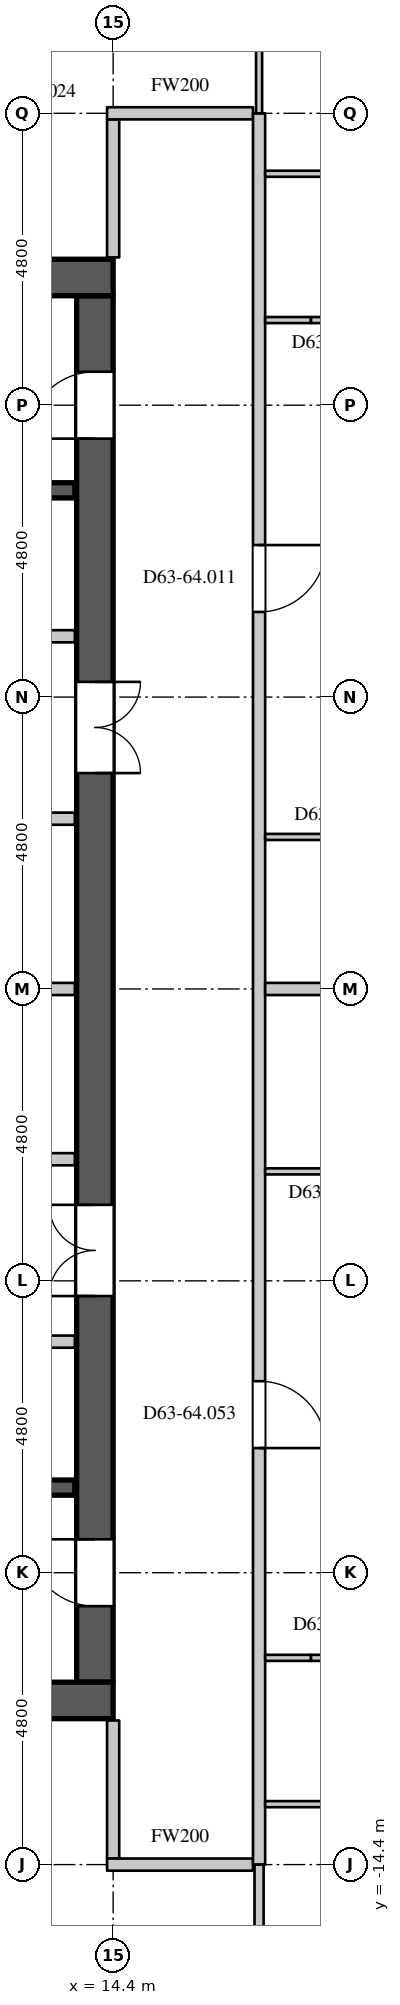
"""IFC4 building model, lengths in metres.
Left out: names, types, materials, properties, quantities, classifications, styles, units other than length and angle.
Written with IfcOpenShell. Run it as: python <this file> out.ifc"""

import sys

from ifc_helpers import new_model, si_unit, direction, frame, frame_2d, origin, place, context, subcontext, project, spatial, rectangle, extrude, element, fill, save


model = new_model("IFC4")
c1 = context("Model", 3, precision=1e-05, world=origin(), true_north=direction((0.0, 1.0)))
c2 = subcontext(c1, "Body", "Model", "MODEL_VIEW")
j1 = project(units=[si_unit("LENGTHUNIT", "METRE"), si_unit("PLANEANGLEUNIT", "RADIAN")], contexts=[c1])
p1 = place(None, origin())
s1 = spatial("IfcSite", under=j1, at=p1, CompositionType="ELEMENT")
p2 = place(p1, origin())
s2 = spatial("IfcBuilding", under=s1, at=p2, CompositionType="ELEMENT")
p3 = place(p2, frame((0.0, 0.0, 272.7)))
s3 = spatial("IfcBuildingStorey", under=s2, at=p3, CompositionType="ELEMENT", Elevation=272.7)
for number, where, z_axis, x_axis in (
    (1, (-14.4, 11.7, 0.0), (0.0, 0.0, 1.0), (1.0, 0.0, 0.0)),
    (2, (-14.4, -11.7, 0.0), (0.0, 0.0, 1.0), (1.0, 0.0, 0.0)),
):
    element("IfcWall", number, at=place(p3, frame(where, z_axis=z_axis, x_axis=x_axis)), inside=s3, PredefinedType="SHEAR", context=c2, shape_type="SweptSolid", body=[
        extrude(rectangle(XDim=28.8, YDim=0.6, at=frame_2d((14.4, 0.0))), origin(), (0.0, 0.0, 1.0), 4.2),
    ])
p4 = place(p3, frame((14.1, -11.4, 0.0), z_axis=(0.0, 0.0, 1.0), x_axis=(0.0, 1.0, 0.0)))
e3 = element("IfcWall", 3, at=p4, inside=s3, PredefinedType="SHEAR", context=c2, shape_type="SweptSolid", body=[
    extrude(rectangle(XDim=22.8, YDim=0.6, at=frame_2d((11.4, 0.0))), origin(), (0.0, 0.0, 1.0), 4.2),
])
p5 = place(p4, frame((20.45, 0.0, 0.0)))
e4 = element("IfcOpeningElement", 4, at=p5, cuts=e3, PredefinedType="OPENING", context=c2, shape_type="SweptSolid", body=[
    extrude(rectangle(XDim=1.1, YDim=2.2, at=frame_2d((0.55, 1.1))), frame((0.0, 0.31, 0.0), z_axis=(0.0, -1.0, 0.0), x_axis=(1.0, 0.0, 0.0)), (0.0, 0.0, 1.0), 0.62),
])
p6 = place(p4, frame((1.25, 0.0, 0.0)))
e5 = element("IfcOpeningElement", 5, at=p6, cuts=e3, PredefinedType="OPENING", context=c2, shape_type="SweptSolid", body=[
    extrude(rectangle(XDim=1.1, YDim=2.2, at=frame_2d((0.55, 1.1))), frame((0.0, 0.31, 0.0), z_axis=(0.0, -1.0, 0.0), x_axis=(1.0, 0.0, 0.0)), (0.0, 0.0, 1.0), 0.62),
])
p7 = place(p4, frame((14.95, 0.0, 0.0)))
e6 = element("IfcOpeningElement", 6, at=p7, cuts=e3, PredefinedType="OPENING", context=c2, shape_type="SweptSolid", body=[
    extrude(rectangle(XDim=1.5, YDim=2.4, at=frame_2d((0.75, 1.2))), frame((0.0, 0.31, 0.0), z_axis=(0.0, -1.0, 0.0), x_axis=(1.0, 0.0, 0.0)), (0.0, 0.0, 1.0), 0.62),
])
p8 = place(p4, frame((6.35, 0.0, 0.0)))
e7 = element("IfcOpeningElement", 7, at=p8, cuts=e3, PredefinedType="OPENING", context=c2, shape_type="SweptSolid", body=[
    extrude(rectangle(XDim=1.5, YDim=2.4, at=frame_2d((0.75, 1.2))), frame((0.0, 0.31, 0.0), z_axis=(0.0, -1.0, 0.0), x_axis=(1.0, 0.0, 0.0)), (0.0, 0.0, 1.0), 0.62),
])
p9 = place(p3, frame((0.98, 5.8, 0.0), z_axis=(0.0, 0.0, 1.0), x_axis=(1.0, 0.0, 0.0)))
e8 = element("IfcWall", 8, at=p9, inside=s3, PredefinedType="PARTITIONING", context=c2, shape_type="SweptSolid", body=[
    extrude(rectangle(XDim=12.79, YDim=0.2, at=frame_2d((6.395, 0.0))), origin(), (0.0, 0.0, 1.0), 3.95),
])
p10 = place(p9, frame((3.05, 0.0, 0.0)))
e9 = element("IfcOpeningElement", 9, at=p10, cuts=e8, PredefinedType="OPENING", context=c2, shape_type="SweptSolid", body=[
    extrude(rectangle(XDim=0.9, YDim=2.2, at=frame_2d((0.45, 1.1))), frame((0.0, 0.11, 0.0), z_axis=(0.0, -1.0, 0.0), x_axis=(1.0, 0.0, 0.0)), (0.0, 0.0, 1.0), 0.22),
])
p11 = place(p9, frame((9.25, 0.0, 0.0)))
e10 = element("IfcOpeningElement", 10, at=p11, cuts=e8, PredefinedType="OPENING", context=c2, shape_type="SweptSolid", body=[
    extrude(rectangle(XDim=0.9, YDim=2.2, at=frame_2d((0.45, 1.1))), frame((0.0, 0.11, 0.0), z_axis=(0.0, -1.0, 0.0), x_axis=(1.0, 0.0, 0.0)), (0.0, 0.0, 1.0), 0.22),
])
p12 = place(p3, frame((4.02, -5.8, 0.0), z_axis=(0.0, 0.0, 1.0), x_axis=(1.0, 0.0, 0.0)))
e11 = element("IfcWall", 11, at=p12, inside=s3, PredefinedType="PARTITIONING", context=c2, shape_type="SweptSolid", body=[
    extrude(rectangle(XDim=9.75, YDim=0.2, at=frame_2d((4.875, 0.0))), origin(), (0.0, 0.0, 1.0), 3.95),
])
p13 = place(p12, frame((4.45, 0.0, 0.0)))
e12 = element("IfcOpeningElement", 12, at=p13, cuts=e11, PredefinedType="OPENING", context=c2, shape_type="SweptSolid", body=[
    extrude(rectangle(XDim=0.9, YDim=2.2, at=frame_2d((0.45, 1.1))), frame((0.0, 0.11, 0.0), z_axis=(0.0, -1.0, 0.0), x_axis=(1.0, 0.0, 0.0)), (0.0, 0.0, 1.0), 0.22),
])
p14 = place(p3, frame((14.4, -14.3, 0.0), z_axis=(0.0, 0.0, 1.0), x_axis=(0.0, 1.0, 0.0)))
e13 = element("IfcWall", 13, at=p14, inside=s3, PredefinedType="PARTITIONING", context=c2, shape_type="SweptSolid", body=[
    extrude(rectangle(XDim=2.27, YDim=0.2, at=frame_2d((1.135, 0.0))), origin(), (0.0, 0.0, 1.0), 3.95),
])
p15 = place(p3, frame((14.3, -14.4, 0.0), z_axis=(0.0, 0.0, 1.0), x_axis=(1.0, 0.0, 0.0)))
e14 = element("IfcWall", 14, at=p15, inside=s3, PredefinedType="PARTITIONING", context=c2, shape_type="SweptSolid", body=[
    extrude(rectangle(XDim=2.4, YDim=0.2, at=frame_2d((1.2, 0.0))), origin(), (0.0, 0.0, 1.0), 3.95),
])
p16 = place(p3, frame((14.4, 12.03, 0.0), z_axis=(0.0, 0.0, 1.0), x_axis=(0.0, 1.0, 0.0)))
e15 = element("IfcWall", 15, at=p16, inside=s3, PredefinedType="PARTITIONING", context=c2, shape_type="SweptSolid", body=[
    extrude(rectangle(XDim=2.27, YDim=0.2, at=frame_2d((1.135, 0.0))), origin(), (0.0, 0.0, 1.0), 3.95),
])
p17 = place(p3, frame((14.3, 14.4, 0.0), z_axis=(0.0, 0.0, 1.0), x_axis=(1.0, 0.0, 0.0)))
e16 = element("IfcWall", 16, at=p17, inside=s3, PredefinedType="PARTITIONING", context=c2, shape_type="SweptSolid", body=[
    extrude(rectangle(XDim=2.4, YDim=0.2, at=frame_2d((1.2, 0.0))), origin(), (0.0, 0.0, 1.0), 3.95),
])
p18 = place(p3, frame((16.8, -14.4, 0.0), z_axis=(0.0, 0.0, 1.0), x_axis=(0.0, 1.0, 0.0)))
e17 = element("IfcWall", 17, at=p18, inside=s3, PredefinedType="PARTITIONING", context=c2, shape_type="SweptSolid", body=[
    extrude(rectangle(XDim=28.8, YDim=0.2, at=frame_2d((14.4, 0.0))), origin(), (0.0, 0.0, 1.0), 3.95),
])
p19 = place(p18, frame((20.6, 0.0, 0.0)))
e18 = element("IfcOpeningElement", 18, at=p19, cuts=e17, PredefinedType="OPENING", context=c2, shape_type="SweptSolid", body=[
    extrude(rectangle(XDim=1.1, YDim=2.4, at=frame_2d((0.55, 1.2))), frame((0.0, 0.11, 0.0), z_axis=(0.0, -1.0, 0.0), x_axis=(1.0, 0.0, 0.0)), (0.0, 0.0, 1.0), 0.22),
])
p20 = place(p18, frame((6.85, 0.0, 0.0)))
e19 = element("IfcOpeningElement", 19, at=p20, cuts=e17, PredefinedType="OPENING", context=c2, shape_type="SweptSolid", body=[
    extrude(rectangle(XDim=1.1, YDim=2.4, at=frame_2d((0.55, 1.2))), frame((0.0, 0.11, 0.0), z_axis=(0.0, -1.0, 0.0), x_axis=(1.0, 0.0, 0.0)), (0.0, 0.0, 1.0), 0.22),
])
p21 = place(p3, frame((16.8, -19.828, 0.0), z_axis=(0.0, 0.0, 1.0), x_axis=(0.0, 1.0, 0.0)))
e20 = element("IfcWall", 20, at=p21, inside=s3, PredefinedType="PARTITIONING", context=c2, shape_type="SweptSolid", body=[
    extrude(rectangle(XDim=5.428, YDim=0.15, at=frame_2d((2.714, 0.0))), origin(), (0.0, 0.0, 1.0), 3.95),
])
p22 = place(p21, frame((2.85, 0.0, 0.0)))
e21 = element("IfcOpeningElement", 21, at=p22, cuts=e20, PredefinedType="OPENING", context=c2, shape_type="SweptSolid", body=[
    extrude(rectangle(XDim=0.9, YDim=2.2, at=frame_2d((0.45, 1.1))), frame((0.0, 0.085, 0.0), z_axis=(0.0, -1.0, 0.0), x_axis=(1.0, 0.0, 0.0)), (0.0, 0.0, 1.0), 0.17),
])
p23 = place(p21, frame((0.2, 0.0, 0.0)))
e22 = element("IfcOpeningElement", 22, at=p23, cuts=e20, PredefinedType="OPENING", context=c2, shape_type="SweptSolid", body=[
    extrude(rectangle(XDim=0.95, YDim=2.2, at=frame_2d((0.475, 1.1))), frame((0.0, 0.085, 0.0), z_axis=(0.0, -1.0, 0.0), x_axis=(1.0, 0.0, 0.0)), (0.0, 0.0, 1.0), 0.17),
])
p24 = place(p3, frame((16.9, 0.0, 0.0), z_axis=(0.0, 0.0, 1.0), x_axis=(1.0, 0.0, 0.0)))
e23 = element("IfcWall", 23, at=p24, inside=s3, PredefinedType="PARTITIONING", context=c2, shape_type="SweptSolid", body=[
    extrude(rectangle(XDim=9.555, YDim=0.2, at=frame_2d((4.778, 0.0))), origin(), (0.0, 0.0, 1.0), 3.95),
])
p25 = place(p3, frame((7.8, -2.8, 0.0), z_axis=(0.0, 0.0, 1.0), x_axis=(1.0, 0.0, 0.0)))
e24 = element("IfcWall", 24, at=p25, inside=s3, PredefinedType="PARTITIONING", context=c2, shape_type="SweptSolid", body=[
    extrude(rectangle(XDim=5.97, YDim=0.2, at=frame_2d((2.985, 0.0))), origin(), (0.0, 0.0, 1.0), 3.95),
])
p26 = place(p25, frame((2.55, 0.0, 0.0)))
e25 = element("IfcOpeningElement", 25, at=p26, cuts=e24, PredefinedType="OPENING", context=c2, shape_type="SweptSolid", body=[
    extrude(rectangle(XDim=0.9, YDim=2.2, at=frame_2d((0.45, 1.1))), frame((0.0, 0.11, 0.0), z_axis=(0.0, -1.0, 0.0), x_axis=(1.0, 0.0, 0.0)), (0.0, 0.0, 1.0), 0.22),
])
p27 = place(p3, frame((7.8, 0.0, 0.0), z_axis=(0.0, 0.0, 1.0), x_axis=(1.0, 0.0, 0.0)))
e26 = element("IfcWall", 26, at=p27, inside=s3, PredefinedType="PARTITIONING", context=c2, shape_type="SweptSolid", body=[
    extrude(rectangle(XDim=5.97, YDim=0.2, at=frame_2d((2.985, 0.0))), origin(), (0.0, 0.0, 1.0), 3.95),
])
p28 = place(p3, frame((10.42, 2.8, 0.0), z_axis=(0.0, 0.0, 1.0), x_axis=(1.0, 0.0, 0.0)))
e27 = element("IfcWall", 27, at=p28, inside=s3, PredefinedType="PARTITIONING", context=c2, shape_type="SweptSolid", body=[
    extrude(rectangle(XDim=3.35, YDim=0.2, at=frame_2d((1.675, 0.0))), origin(), (0.0, 0.0, 1.0), 3.95),
])
p29 = place(p28, frame((1.35, 0.0, 0.0)))
e28 = element("IfcOpeningElement", 28, at=p29, cuts=e27, PredefinedType="OPENING", context=c2, shape_type="SweptSolid", body=[
    extrude(rectangle(XDim=0.6, YDim=2.0, at=frame_2d((0.3, 1.0))), frame((0.0, 0.11, 0.0), z_axis=(0.0, -1.0, 0.0), x_axis=(1.0, 0.0, 0.0)), (0.0, 0.0, 1.0), 0.22),
])
for number, where, z_axis, x_axis in (
    (29, (5.275, -8.2, 0.0), (0.0, 0.0, 1.0), (1.0, 0.0, 0.0)),
    (30, (5.275, 8.2, 0.0), (0.0, 0.0, 1.0), (1.0, 0.0, 0.0)),
):
    element("IfcWall", number, at=place(p3, frame(where, z_axis=z_axis, x_axis=x_axis)), inside=s3, PredefinedType="SHEAR", context=c2, shape_type="SweptSolid", body=[
        extrude(rectangle(XDim=8.495, YDim=0.25, at=frame_2d((4.248, 0.0))), origin(), (0.0, 0.0, 1.0), 3.95),
    ])
p30 = place(p3, frame((16.9, -13.406, 0.0), z_axis=(0.0, 0.0, 1.0), x_axis=(1.0, 0.0, 0.0)))
e31 = element("IfcWall", 31, at=p30, inside=s3, PredefinedType="PARTITIONING", context=c2, shape_type="SweptSolid", body=[
    extrude(rectangle(XDim=3.6, YDim=0.1, at=frame_2d((1.8, 0.0))), origin(), (0.0, 0.0, 1.0), 3.95),
])
p31 = place(p3, frame((16.9, -11.0, 0.0), z_axis=(0.0, 0.0, 1.0), x_axis=(1.0, 0.0, 0.0)))
e32 = element("IfcWall", 32, at=p31, inside=s3, PredefinedType="PARTITIONING", context=c2, shape_type="SweptSolid", body=[
    extrude(rectangle(XDim=0.754, YDim=0.1, at=frame_2d((0.377, 0.0))), origin(), (0.0, 0.0, 1.0), 3.35),
])
p32 = place(p3, frame((17.654, -11.0, 0.0), z_axis=(0.0, 0.0, 1.0), x_axis=(1.0, 0.0, 0.0)))
e33 = element("IfcWall", 33, at=p32, inside=s3, PredefinedType="PARTITIONING", context=c2, shape_type="SweptSolid", body=[
    extrude(rectangle(XDim=2.771, YDim=0.1, at=frame_2d((1.386, 0.0))), origin(), (0.0, 0.0, 1.0), 3.95),
])
p33 = place(p32, frame((0.546, 0.0, 0.0)))
e34 = element("IfcOpeningElement", 34, at=p33, cuts=e33, PredefinedType="OPENING", context=c2, shape_type="SweptSolid", body=[
    extrude(rectangle(XDim=0.9, YDim=2.2, at=frame_2d((0.45, 1.1))), frame((0.0, 0.06, 0.0), z_axis=(0.0, -1.0, 0.0), x_axis=(1.0, 0.0, 0.0)), (0.0, 0.0, 1.0), 0.12),
])
p34 = place(p3, frame((16.9, -3.0, 0.0), z_axis=(0.0, 0.0, 1.0), x_axis=(1.0, 0.0, 0.0)))
e35 = element("IfcWall", 35, at=p34, inside=s3, PredefinedType="PARTITIONING", context=c2, shape_type="SweptSolid", body=[
    extrude(rectangle(XDim=3.025, YDim=0.1, at=frame_2d((1.513, 0.0))), origin(), (0.0, 0.0, 1.0), 3.95),
])
p35 = place(p34, frame((1.05, 0.0, 0.0)))
e36 = element("IfcOpeningElement", 36, at=p35, cuts=e35, PredefinedType="OPENING", context=c2, shape_type="SweptSolid", body=[
    extrude(rectangle(XDim=0.9, YDim=2.2, at=frame_2d((0.45, 1.1))), frame((0.0, 0.06, 0.0), z_axis=(0.0, -1.0, 0.0), x_axis=(1.0, 0.0, 0.0)), (0.0, 0.0, 1.0), 0.12),
])
p36 = place(p3, frame((16.9, 2.5, 0.0), z_axis=(0.0, 0.0, 1.0), x_axis=(1.0, 0.0, 0.0)))
e37 = element("IfcWall", 37, at=p36, inside=s3, PredefinedType="PARTITIONING", context=c2, shape_type="SweptSolid", body=[
    extrude(rectangle(XDim=3.225, YDim=0.1, at=frame_2d((1.613, 0.0))), origin(), (0.0, 0.0, 1.0), 3.95),
])
p37 = place(p36, frame((1.15, 0.0, 0.0)))
e38 = element("IfcOpeningElement", 38, at=p37, cuts=e37, PredefinedType="OPENING", context=c2, shape_type="SweptSolid", body=[
    extrude(rectangle(XDim=0.9, YDim=2.2, at=frame_2d((0.45, 1.1))), frame((0.0, 0.06, 0.0), z_axis=(0.0, -1.0, 0.0), x_axis=(1.0, 0.0, 0.0)), (0.0, 0.0, 1.0), 0.12),
])
p38 = place(p3, frame((16.9, 11.0, 0.0), z_axis=(0.0, 0.0, 1.0), x_axis=(1.0, 0.0, 0.0)))
e39 = element("IfcWall", 39, at=p38, inside=s3, PredefinedType="PARTITIONING", context=c2, shape_type="SweptSolid", body=[
    extrude(rectangle(XDim=0.754, YDim=0.1, at=frame_2d((0.377, 0.0))), origin(), (0.0, 0.0, 1.0), 3.35),
])
p39 = place(p3, frame((17.654, 11.0, 0.0), z_axis=(0.0, 0.0, 1.0), x_axis=(1.0, 0.0, 0.0)))
e40 = element("IfcWall", 40, at=p39, inside=s3, PredefinedType="PARTITIONING", context=c2, shape_type="SweptSolid", body=[
    extrude(rectangle(XDim=2.971, YDim=0.1, at=frame_2d((1.486, 0.0))), origin(), (0.0, 0.0, 1.0), 3.95),
])
p40 = place(p39, frame((0.646, 0.0, 0.0)))
e41 = element("IfcOpeningElement", 41, at=p40, cuts=e40, PredefinedType="OPENING", context=c2, shape_type="SweptSolid", body=[
    extrude(rectangle(XDim=0.9, YDim=2.2, at=frame_2d((0.45, 1.1))), frame((0.0, 0.06, 0.0), z_axis=(0.0, -1.0, 0.0), x_axis=(1.0, 0.0, 0.0)), (0.0, 0.0, 1.0), 0.12),
])
p41 = place(p3, frame((16.9, 13.406, 0.0), z_axis=(0.0, 0.0, 1.0), x_axis=(1.0, 0.0, 0.0)))
e42 = element("IfcWall", 42, at=p41, inside=s3, PredefinedType="PARTITIONING", context=c2, shape_type="SweptSolid", body=[
    extrude(rectangle(XDim=3.8, YDim=0.1, at=frame_2d((1.9, 0.0))), origin(), (0.0, 0.0, 1.0), 3.95),
])
p42 = place(p3, frame((16.8, 14.4, 0.0), z_axis=(0.0, 0.0, 1.0), x_axis=(0.0, 1.0, 0.0)))
e43 = element("IfcWall", 43, at=p42, inside=s3, PredefinedType="PARTITIONING", context=c2, shape_type="SweptSolid", body=[
    extrude(rectangle(XDim=3.6, YDim=0.1, at=frame_2d((1.8, 0.0))), origin(), (0.0, 0.0, 1.0), 3.95),
])
p43 = place(p5, origin())
e44 = element("IfcDoor", 44, at=p43, inside=s3, OperationType="SINGLE_SWING_LEFT", PredefinedType="DOOR", context=c2, shape_type="SweptSolid", body=[
    extrude(rectangle(XDim=1.1, YDim=2.2, at=frame_2d((0.55, 1.1))), frame((0.0, 0.295, 0.0), z_axis=(0.0, -1.0, 0.0), x_axis=(1.0, 0.0, 0.0)), (0.0, 0.0, 1.0), 0.05),
])
fill(e4, e44)
p44 = place(p6, origin())
e45 = element("IfcDoor", 45, at=p44, inside=s3, OperationType="SINGLE_SWING_RIGHT", PredefinedType="DOOR", context=c2, shape_type="SweptSolid", body=[
    extrude(rectangle(XDim=1.1, YDim=2.2, at=frame_2d((0.55, 1.1))), frame((0.0, 0.295, 0.0), z_axis=(0.0, -1.0, 0.0), x_axis=(1.0, 0.0, 0.0)), (0.0, 0.0, 1.0), 0.05),
])
fill(e5, e45)
p45 = place(p7, origin())
e46 = element("IfcDoor", 46, at=p45, inside=s3, OperationType="DOUBLE_DOOR_SINGLE_SWING", PredefinedType="DOOR", context=c2, shape_type="SweptSolid", body=[
    extrude(rectangle(XDim=1.5, YDim=2.4, at=frame_2d((0.75, 1.2))), frame((0.0, -0.245, 0.0), z_axis=(0.0, -1.0, 0.0), x_axis=(1.0, 0.0, 0.0)), (0.0, 0.0, 1.0), 0.05),
])
fill(e6, e46)
p46 = place(p8, origin())
e47 = element("IfcDoor", 47, at=p46, inside=s3, OperationType="DOUBLE_DOOR_SINGLE_SWING", PredefinedType="DOOR", context=c2, shape_type="SweptSolid", body=[
    extrude(rectangle(XDim=1.5, YDim=2.4, at=frame_2d((0.75, 1.2))), frame((0.0, 0.295, 0.0), z_axis=(0.0, -1.0, 0.0), x_axis=(1.0, 0.0, 0.0)), (0.0, 0.0, 1.0), 0.05),
])
fill(e7, e47)
p47 = place(p19, origin())
e48 = element("IfcDoor", 48, at=p47, inside=s3, OperationType="SINGLE_SWING_LEFT", PredefinedType="DOOR", context=c2, shape_type="SweptSolid", body=[
    extrude(rectangle(XDim=1.1, YDim=2.4, at=frame_2d((0.55, 1.2))), frame((0.0, 0.025, 0.0), z_axis=(0.0, -1.0, 0.0), x_axis=(1.0, 0.0, 0.0)), (0.0, 0.0, 1.0), 0.05),
])
fill(e18, e48)
p48 = place(p20, origin())
e49 = element("IfcDoor", 49, at=p48, inside=s3, OperationType="SINGLE_SWING_RIGHT", PredefinedType="DOOR", context=c2, shape_type="SweptSolid", body=[
    extrude(rectangle(XDim=1.1, YDim=2.4, at=frame_2d((0.55, 1.2))), frame((0.0, 0.025, 0.0), z_axis=(0.0, -1.0, 0.0), x_axis=(1.0, 0.0, 0.0)), (0.0, 0.0, 1.0), 0.05),
])
fill(e19, e49)
save(model, sys.argv[1])
